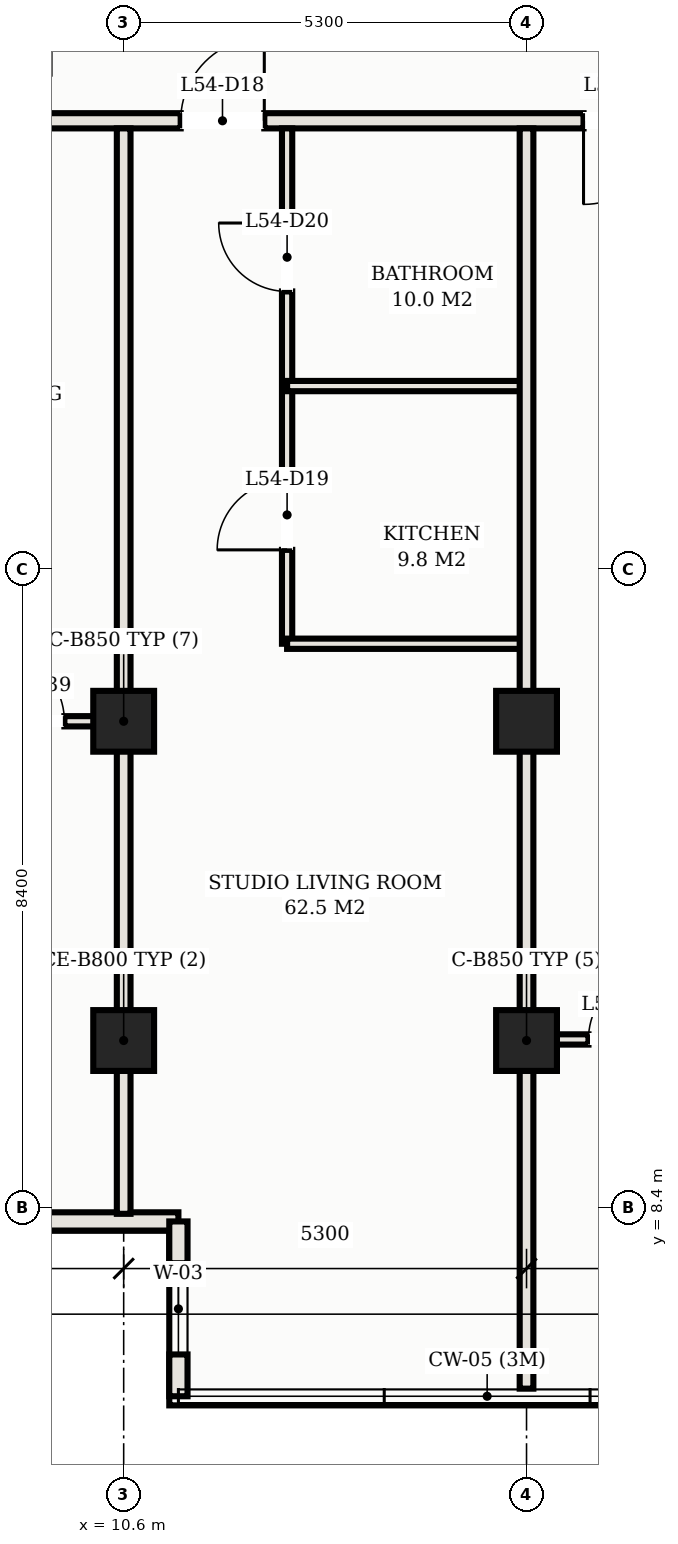
"""IFC4 building model, lengths in metres.
Left out: names, types, materials, properties, quantities, classifications, styles, units other than length and angle.
Written with IfcOpenShell. Run it as: python <this file> out.ifc"""

import sys

from ifc_helpers import new_model, si_unit, direction, frame, frame_2d, origin, origin_2d, place, context, subcontext, project, spatial, rectangle, hollow_rectangle, extrude, element, fill, save


model = new_model("IFC4")
c1 = context("Model", 3, precision=1e-05, world=origin(), true_north=direction((0.0, 1.0)))
c2 = subcontext(c1, "Body", "Model", "MODEL_VIEW")
j1 = project(units=[si_unit("LENGTHUNIT", "METRE"), si_unit("PLANEANGLEUNIT", "RADIAN")], contexts=[c1])
p1 = place(None, origin())
s1 = spatial("IfcSite", under=j1, at=p1, CompositionType="ELEMENT")
p2 = place(p1, origin())
s2 = spatial("IfcBuilding", under=s1, at=p2, CompositionType="ELEMENT")
p3 = place(p2, frame((0.0, 0.0, 200.0)))
s3 = spatial("IfcBuildingStorey", under=s2, at=p3, CompositionType="ELEMENT", Elevation=200.0)
for number, where, z_axis, x_axis in (
    (1, (10.6, 14.8, 0.0), (0.0, 0.0, 1.0), (1.0, 0.0, 0.0)),
    (2, (10.6, 10.6, 0.0), (0.0, 0.0, 1.0), (1.0, 0.0, 0.0)),
    (3, (15.9, 14.8, 0.0), (0.0, 0.0, 1.0), (1.0, 0.0, 0.0)),
    (4, (15.9, 10.6, 0.0), (0.0, 0.0, 1.0), (1.0, 0.0, 0.0)),
):
    element("IfcColumn", number, at=place(p3, frame(where, z_axis=z_axis, x_axis=x_axis)), inside=s3, PredefinedType="COLUMN", context=c2, shape_type="SweptSolid", body=[
        extrude(hollow_rectangle(XDim=0.8, YDim=0.8, WallThickness=0.028, at=origin_2d()), origin(), (0.0, 0.0, 1.0), 3.3),
    ])
p4 = place(p3, frame((9.02, 8.22, 0.0), z_axis=(0.0, 0.0, 1.0), x_axis=(1.0, 0.0, 0.0)))
e5 = element("IfcWall", 5, at=p4, inside=s3, PredefinedType="SOLIDWALL", context=c2, shape_type="SweptSolid", body=[
    extrude(rectangle(XDim=2.3, YDim=0.24, at=frame_2d((1.15, 0.0))), origin(), (0.0, 0.0, 1.0), 3.11),
])
p5 = place(p3, frame((11.32, 8.22, 0.0), z_axis=(0.0, 0.0, 1.0), x_axis=(0.0, -1.0, 0.0)))
e6 = element("IfcWall", 6, at=p5, inside=s3, PredefinedType="SOLIDWALL", context=c2, shape_type="SweptSolid", body=[
    extrude(rectangle(XDim=2.3, YDim=0.24, at=frame_2d((1.15, 0.0))), origin(), (0.0, 0.0, 1.0), 3.11),
])
p6 = place(p5, frame((0.55, 0.0, 0.75)))
e7 = element("IfcOpeningElement", 7, at=p6, cuts=e6, PredefinedType="OPENING", context=c2, shape_type="SweptSolid", body=[
    extrude(rectangle(XDim=1.2, YDim=1.5, at=frame_2d((0.6, 0.75))), frame((0.0, 0.13, 0.0), z_axis=(0.0, -1.0, 0.0), x_axis=(1.0, 0.0, 0.0)), (0.0, 0.0, 1.0), 0.26),
])
p7 = place(p3, frame((6.72, 22.7, 0.0), z_axis=(0.0, 0.0, 1.0), x_axis=(1.0, 0.0, 0.0)))
e8 = element("IfcWall", 8, at=p7, inside=s3, PredefinedType="PARTITIONING", context=c2, shape_type="SweptSolid", body=[
    extrude(rectangle(XDim=39.56, YDim=0.2, at=frame_2d((19.78, 0.0))), origin(), (0.0, 0.0, 1.0), 2.43),
])
p8 = place(p7, frame((4.63, 0.0, 0.0)))
e9 = element("IfcOpeningElement", 9, at=p8, cuts=e8, PredefinedType="OPENING", context=c2, shape_type="SweptSolid", body=[
    extrude(rectangle(XDim=1.1, YDim=2.25, at=frame_2d((0.55, 1.125))), frame((0.0, 0.11, 0.0), z_axis=(0.0, -1.0, 0.0), x_axis=(1.0, 0.0, 0.0)), (0.0, 0.0, 1.0), 0.22),
])
p9 = place(p7, frame((9.93, 0.0, 0.0)))
e10 = element("IfcOpeningElement", 10, at=p9, cuts=e8, PredefinedType="OPENING", context=c2, shape_type="SweptSolid", body=[
    extrude(rectangle(XDim=1.1, YDim=2.25, at=frame_2d((0.55, 1.125))), frame((0.0, 0.11, 0.0), z_axis=(0.0, -1.0, 0.0), x_axis=(1.0, 0.0, 0.0)), (0.0, 0.0, 1.0), 0.22),
])
p10 = place(p7, frame((25.83, 0.0, 0.0)))
e11 = element("IfcOpeningElement", 11, at=p10, cuts=e8, PredefinedType="OPENING", context=c2, shape_type="SweptSolid", body=[
    extrude(rectangle(XDim=1.1, YDim=2.25, at=frame_2d((0.55, 1.125))), frame((0.0, 0.11, 0.0), z_axis=(0.0, -1.0, 0.0), x_axis=(1.0, 0.0, 0.0)), (0.0, 0.0, 1.0), 0.22),
])
p11 = place(p7, frame((1.435, 0.0, 0.0)))
e12 = element("IfcOpeningElement", 12, at=p11, cuts=e8, PredefinedType="OPENING", context=c2, shape_type="SweptSolid", body=[
    extrude(rectangle(XDim=0.92, YDim=2.15, at=frame_2d((0.46, 1.075))), frame((0.0, 0.11, 0.0), z_axis=(0.0, -1.0, 0.0), x_axis=(1.0, 0.0, 0.0)), (0.0, 0.0, 1.0), 0.22),
])
p12 = place(p7, frame((37.205, 0.0, 0.0)))
e13 = element("IfcOpeningElement", 13, at=p12, cuts=e8, PredefinedType="OPENING", context=c2, shape_type="SweptSolid", body=[
    extrude(rectangle(XDim=0.92, YDim=2.15, at=frame_2d((0.46, 1.075))), frame((0.0, 0.11, 0.0), z_axis=(0.0, -1.0, 0.0), x_axis=(1.0, 0.0, 0.0)), (0.0, 0.0, 1.0), 0.22),
])
p13 = place(p3, frame((10.6, 8.32, 0.0), z_axis=(0.0, 0.0, 1.0), x_axis=(0.0, 1.0, 0.0)))
e14 = element("IfcWall", 14, at=p13, inside=s3, PredefinedType="PARTITIONING", context=c2, shape_type="SweptSolid", body=[
    extrude(rectangle(XDim=14.28, YDim=0.18, at=frame_2d((7.14, 0.0))), origin(), (0.0, 0.0, 1.0), 2.43),
])
p14 = place(p3, frame((12.75, 15.82, 0.0), z_axis=(0.0, 0.0, 1.0), x_axis=(0.0, 1.0, 0.0)))
e15 = element("IfcWall", 15, at=p14, inside=s3, PredefinedType="PARTITIONING", context=c2, shape_type="SweptSolid", body=[
    extrude(rectangle(XDim=6.78, YDim=0.135, at=frame_2d((3.39, 0.0))), origin(), (0.0, 0.0, 1.0), 2.43),
])
p15 = place(p14, frame((1.235, 0.0, 0.0)))
e16 = element("IfcOpeningElement", 16, at=p15, cuts=e15, PredefinedType="OPENING", context=c2, shape_type="SweptSolid", body=[
    extrude(rectangle(XDim=0.92, YDim=2.15, at=frame_2d((0.46, 1.075))), frame((0.0, 0.078, 0.0), z_axis=(0.0, -1.0, 0.0), x_axis=(1.0, 0.0, 0.0)), (0.0, 0.0, 1.0), 0.155),
])
p16 = place(p14, frame((4.635, 0.0, 0.0)))
e17 = element("IfcOpeningElement", 17, at=p16, cuts=e15, PredefinedType="OPENING", context=c2, shape_type="SweptSolid", body=[
    extrude(rectangle(XDim=0.9, YDim=2.15, at=frame_2d((0.45, 1.075))), frame((0.0, 0.078, 0.0), z_axis=(0.0, -1.0, 0.0), x_axis=(1.0, 0.0, 0.0)), (0.0, 0.0, 1.0), 0.155),
])
for number, where, z_axis, x_axis in (
    (18, (12.75, 15.82, 0.0), (0.0, 0.0, 1.0), (1.0, 0.0, 0.0)),
    (19, (12.75, 19.21, 0.0), (0.0, 0.0, 1.0), (1.0, 0.0, 0.0)),
):
    element("IfcWall", number, at=place(p3, frame(where, z_axis=z_axis, x_axis=x_axis)), inside=s3, PredefinedType="PARTITIONING", context=c2, shape_type="SweptSolid", body=[
        extrude(rectangle(XDim=3.15, YDim=0.135, at=frame_2d((1.575, 0.0))), origin(), (0.0, 0.0, 1.0), 2.43),
    ])
p17 = place(p3, frame((15.9, 6.02, 0.0), z_axis=(0.0, 0.0, 1.0), x_axis=(0.0, 1.0, 0.0)))
e20 = element("IfcWall", 20, at=p17, inside=s3, PredefinedType="PARTITIONING", context=c2, shape_type="SweptSolid", body=[
    extrude(rectangle(XDim=16.58, YDim=0.18, at=frame_2d((8.29, 0.0))), origin(), (0.0, 0.0, 1.0), 2.43),
])
p18 = place(p3, frame((15.9, 10.614, 0.0), z_axis=(0.0, 0.0, 1.0), x_axis=(1.0, 0.0, 0.0)))
e21 = element("IfcWall", 21, at=p18, inside=s3, PredefinedType="PARTITIONING", context=c2, shape_type="SweptSolid", body=[
    extrude(rectangle(XDim=10.6, YDim=0.135, at=frame_2d((5.3, 0.0))), origin(), (0.0, 0.0, 1.0), 2.43),
])
p19 = place(p18, frame((0.815, 0.0, 0.0)))
e22 = element("IfcOpeningElement", 22, at=p19, cuts=e21, PredefinedType="OPENING", context=c2, shape_type="SweptSolid", body=[
    extrude(rectangle(XDim=0.92, YDim=2.15, at=frame_2d((0.46, 1.075))), frame((0.0, 0.078, 0.0), z_axis=(0.0, -1.0, 0.0), x_axis=(1.0, 0.0, 0.0)), (0.0, 0.0, 1.0), 0.155),
])
p20 = place(p3, frame((6.82, 14.8, 0.0), z_axis=(0.0, 0.0, 1.0), x_axis=(1.0, 0.0, 0.0)))
e23 = element("IfcWall", 23, at=p20, inside=s3, PredefinedType="PARTITIONING", context=c2, shape_type="SweptSolid", body=[
    extrude(rectangle(XDim=3.78, YDim=0.135, at=frame_2d((1.89, 0.0))), origin(), (0.0, 0.0, 1.0), 2.43),
])
p21 = place(p20, frame((2.08, 0.0, 0.0)))
e24 = element("IfcOpeningElement", 24, at=p21, cuts=e23, PredefinedType="OPENING", context=c2, shape_type="SweptSolid", body=[
    extrude(rectangle(XDim=0.92, YDim=2.15, at=frame_2d((0.46, 1.075))), frame((0.0, 0.078, 0.0), z_axis=(0.0, -1.0, 0.0), x_axis=(1.0, 0.0, 0.0)), (0.0, 0.0, 1.0), 0.155),
])
p22 = place(p6, origin())
e25 = element("IfcWindow", 25, at=p22, inside=s3, PartitioningType="SINGLE_PANEL", PredefinedType="WINDOW", context=c2, shape_type="SweptSolid", body=[
    extrude(rectangle(XDim=1.2, YDim=1.5, at=frame_2d((0.6, 0.75))), frame((0.0, 0.03, 0.0), z_axis=(0.0, -1.0, 0.0), x_axis=(1.0, 0.0, 0.0)), (0.0, 0.0, 1.0), 0.06),
])
fill(e7, e25)
p23 = place(p8, origin())
e26 = element("IfcDoor", 26, at=p23, inside=s3, OperationType="SINGLE_SWING_RIGHT", PredefinedType="DOOR", context=c2, shape_type="SweptSolid", body=[
    extrude(rectangle(XDim=1.1, YDim=2.25, at=frame_2d((0.55, 1.125))), frame((0.0, 0.025, 0.0), z_axis=(0.0, -1.0, 0.0), x_axis=(1.0, 0.0, 0.0)), (0.0, 0.0, 1.0), 0.05),
])
fill(e9, e26)
p24 = place(p15, origin())
e27 = element("IfcDoor", 27, at=p24, inside=s3, OperationType="SINGLE_SWING_LEFT", PredefinedType="DOOR", context=c2, shape_type="SweptSolid", body=[
    extrude(rectangle(XDim=0.92, YDim=2.15, at=frame_2d((0.46, 1.075))), frame((0.0, 0.025, 0.0), z_axis=(0.0, -1.0, 0.0), x_axis=(1.0, 0.0, 0.0)), (0.0, 0.0, 1.0), 0.05),
])
fill(e16, e27)
p25 = place(p16, origin())
e28 = element("IfcDoor", 28, at=p25, inside=s3, OperationType="SINGLE_SWING_RIGHT", PredefinedType="DOOR", context=c2, shape_type="SweptSolid", body=[
    extrude(rectangle(XDim=0.9, YDim=2.15, at=frame_2d((0.45, 1.075))), frame((0.0, 0.025, 0.0), z_axis=(0.0, -1.0, 0.0), x_axis=(1.0, 0.0, 0.0)), (0.0, 0.0, 1.0), 0.05),
])
fill(e17, e28)
p26 = place(p9, frame((1.1, 0.0, 0.0), z_axis=(0.0, 0.0, 1.0), x_axis=(-1.0, 0.0, 0.0)))
e29 = element("IfcDoor", 29, at=p26, inside=s3, OperationType="SINGLE_SWING_RIGHT", PredefinedType="DOOR", context=c2, shape_type="SweptSolid", body=[
    extrude(rectangle(XDim=1.1, YDim=2.25, at=frame_2d((0.55, 1.125))), frame((0.0, 0.025, 0.0), z_axis=(0.0, -1.0, 0.0), x_axis=(1.0, 0.0, 0.0)), (0.0, 0.0, 1.0), 0.05),
])
fill(e10, e29)
p27 = place(p19, origin())
e30 = element("IfcDoor", 30, at=p27, inside=s3, OperationType="SINGLE_SWING_RIGHT", PredefinedType="DOOR", context=c2, shape_type="SweptSolid", body=[
    extrude(rectangle(XDim=0.92, YDim=2.15, at=frame_2d((0.46, 1.075))), frame((0.0, 0.025, 0.0), z_axis=(0.0, -1.0, 0.0), x_axis=(1.0, 0.0, 0.0)), (0.0, 0.0, 1.0), 0.05),
])
fill(e22, e30)
p28 = place(p21, origin())
e31 = element("IfcDoor", 31, at=p28, inside=s3, OperationType="SINGLE_SWING_LEFT", PredefinedType="DOOR", context=c2, shape_type="SweptSolid", body=[
    extrude(rectangle(XDim=0.92, YDim=2.15, at=frame_2d((0.46, 1.075))), frame((0.0, 0.025, 0.0), z_axis=(0.0, -1.0, 0.0), x_axis=(1.0, 0.0, 0.0)), (0.0, 0.0, 1.0), 0.05),
])
fill(e24, e31)
save(model, sys.argv[1])
